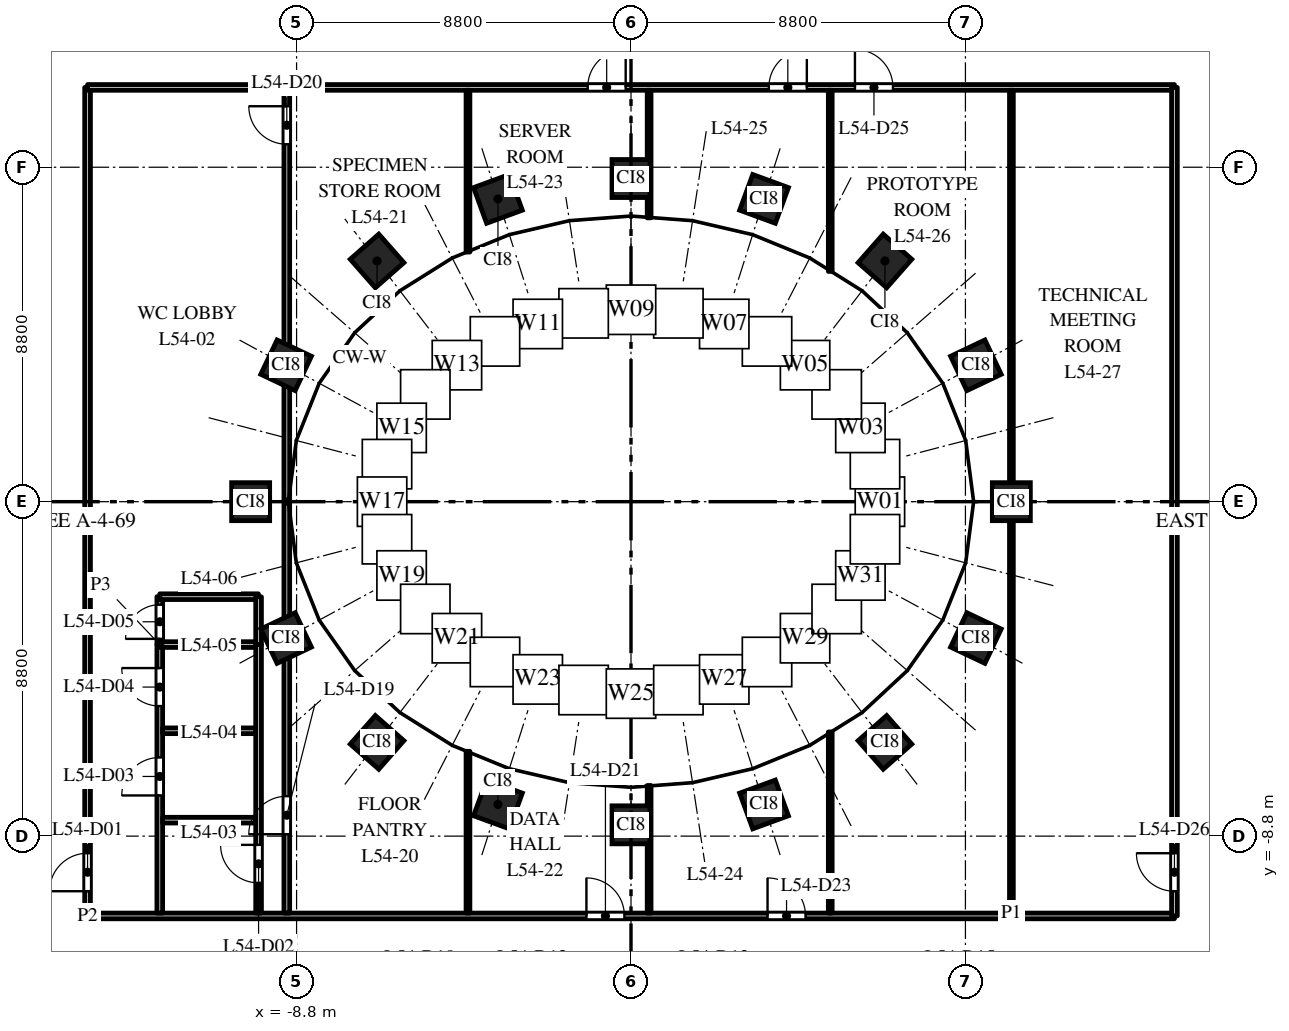
"""IFC4 building model, lengths in metres.
Left out: names, types, materials, properties, quantities, classifications, styles, units other than length and angle.
Written with IfcOpenShell. Run it as: python <this file> out.ifc"""

import sys

from ifc_helpers import new_model, si_unit, direction, frame, frame_2d, origin, origin_2d, place, context, subcontext, project, spatial, rectangle, extrude, element, fill, save


model = new_model("IFC4")
c1 = context("Model", 3, precision=1e-05, world=origin(), true_north=direction((0.0, 1.0)))
c2 = subcontext(c1, "Body", "Model", "MODEL_VIEW")
j1 = project(units=[si_unit("LENGTHUNIT", "METRE"), si_unit("PLANEANGLEUNIT", "RADIAN")], contexts=[c1])
p1 = place(None, origin())
s1 = spatial("IfcSite", under=j1, at=p1, CompositionType="ELEMENT")
p2 = place(p1, origin())
s2 = spatial("IfcBuilding", under=s1, at=p2, CompositionType="ELEMENT")
p3 = place(p2, frame((0.0, 0.0, 257.5)))
s3 = spatial("IfcBuildingStorey", under=s2, at=p3, CompositionType="ELEMENT", Elevation=257.5)
for number, where, z_axis, x_axis in (
    (1, (10.008, 0.0, 0.0), (0.0, 0.0, 1.0), (0.0, 1.0, 0.0)),
    (2, (9.076, 3.588, 0.0), (0.0, 0.0, 1.0), (-0.429, 0.903, 0.0)),
    (3, (6.682, 6.334, 0.0), (0.0, 0.0, 1.0), (-0.751, 0.66, 0.0)),
    (4, (3.501, 7.967, 0.0), (0.0, 0.0, 1.0), (-0.939, 0.344, 0.0)),
    (5, (0.0, 8.503, 0.0), (0.0, 0.0, 1.0), (-1.0, 0.0, 0.0)),
    (6, (-3.501, 7.967, 0.0), (0.0, 0.0, 1.0), (-0.939, -0.344, 0.0)),
    (7, (-6.682, 6.334, 0.0), (0.0, 0.0, 1.0), (-0.751, -0.66, 0.0)),
    (8, (-9.076, 3.588, 0.0), (0.0, 0.0, 1.0), (-0.429, -0.903, 0.0)),
    (9, (-10.008, 0.0, 0.0), (0.0, 0.0, 1.0), (0.0, -1.0, 0.0)),
    (10, (-9.076, -3.588, 0.0), (0.0, 0.0, 1.0), (0.429, -0.903, 0.0)),
    (11, (-6.682, -6.334, 0.0), (0.0, 0.0, 1.0), (0.751, -0.66, 0.0)),
    (12, (-3.501, -7.967, 0.0), (0.0, 0.0, 1.0), (0.939, -0.344, 0.0)),
    (13, (0.0, -8.503, 0.0), (0.0, 0.0, 1.0), (1.0, 0.0, 0.0)),
    (14, (3.501, -7.967, 0.0), (0.0, 0.0, 1.0), (0.939, 0.344, 0.0)),
    (15, (6.682, -6.334, 0.0), (0.0, 0.0, 1.0), (0.751, 0.66, 0.0)),
    (16, (9.076, -3.588, 0.0), (0.0, 0.0, 1.0), (0.429, 0.903, 0.0)),
):
    element("IfcColumn", number, at=place(p3, frame(where, z_axis=z_axis, x_axis=x_axis)), inside=s3, PredefinedType="COLUMN", context=c2, shape_type="SweptSolid", body=[
        extrude(rectangle(XDim=1.0, YDim=1.0, at=origin_2d()), origin(), (0.0, 0.0, 1.0), 4.0),
    ])
p4 = place(p3, frame((-14.3, -10.9, 0.0), z_axis=(0.0, 0.0, 1.0), x_axis=(0.0, 1.0, 0.0)))
e17 = element("IfcWall", 17, at=p4, inside=s3, PredefinedType="PARTITIONING", context=c2, shape_type="SweptSolid", body=[
    extrude(rectangle(XDim=21.8, YDim=0.15, at=frame_2d((10.9, 0.0))), origin(), (0.0, 0.0, 1.0), 2.75),
])
p5 = place(p4, frame((0.65, 0.0, 0.0)))
e18 = element("IfcOpeningElement", 18, at=p5, cuts=e17, PredefinedType="OPENING", context=c2, shape_type="SweptSolid", body=[
    extrude(rectangle(XDim=1.0, YDim=2.1, at=frame_2d((0.5, 1.05))), frame((0.0, 0.085, 0.0), z_axis=(0.0, -1.0, 0.0), x_axis=(1.0, 0.0, 0.0)), (0.0, 0.0, 1.0), 0.17),
])
p6 = place(p3, frame((-14.3, -10.9, 0.0), z_axis=(0.0, 0.0, 1.0), x_axis=(1.0, 0.0, 0.0)))
e19 = element("IfcWall", 19, at=p6, inside=s3, PredefinedType="PARTITIONING", context=c2, shape_type="SweptSolid", body=[
    extrude(rectangle(XDim=28.6, YDim=0.15, at=frame_2d((14.3, 0.0))), origin(), (0.0, 0.0, 1.0), 2.85),
])
p7 = place(p6, frame((13.127, 0.0, 0.0)))
e20 = element("IfcOpeningElement", 20, at=p7, cuts=e19, PredefinedType="OPENING", context=c2, shape_type="SweptSolid", body=[
    extrude(rectangle(XDim=1.0, YDim=2.1, at=frame_2d((0.5, 1.05))), frame((0.0, 0.085, 0.0), z_axis=(0.0, -1.0, 0.0), x_axis=(1.0, 0.0, 0.0)), (0.0, 0.0, 1.0), 0.17),
])
p8 = place(p6, frame((17.893, 0.0, 0.0)))
e21 = element("IfcOpeningElement", 21, at=p8, cuts=e19, PredefinedType="OPENING", context=c2, shape_type="SweptSolid", body=[
    extrude(rectangle(XDim=1.0, YDim=2.1, at=frame_2d((0.5, 1.05))), frame((0.0, 0.085, 0.0), z_axis=(0.0, -1.0, 0.0), x_axis=(1.0, 0.0, 0.0)), (0.0, 0.0, 1.0), 0.17),
])
p9 = place(p3, frame((-14.3, 10.9, 0.0), z_axis=(0.0, 0.0, 1.0), x_axis=(1.0, 0.0, 0.0)))
e22 = element("IfcWall", 22, at=p9, inside=s3, PredefinedType="PARTITIONING", context=c2, shape_type="SweptSolid", body=[
    extrude(rectangle(XDim=28.6, YDim=0.15, at=frame_2d((14.3, 0.0))), origin(), (0.0, 0.0, 1.0), 2.85),
])
p10 = place(p9, frame((13.16, 0.0, 0.0)))
e23 = element("IfcOpeningElement", 23, at=p10, cuts=e22, PredefinedType="OPENING", context=c2, shape_type="SweptSolid", body=[
    extrude(rectangle(XDim=1.0, YDim=2.1, at=frame_2d((0.5, 1.05))), frame((0.0, 0.085, 0.0), z_axis=(0.0, -1.0, 0.0), x_axis=(1.0, 0.0, 0.0)), (0.0, 0.0, 1.0), 0.17),
])
p11 = place(p9, frame((17.927, 0.0, 0.0)))
e24 = element("IfcOpeningElement", 24, at=p11, cuts=e22, PredefinedType="OPENING", context=c2, shape_type="SweptSolid", body=[
    extrude(rectangle(XDim=1.0, YDim=2.1, at=frame_2d((0.5, 1.05))), frame((0.0, 0.085, 0.0), z_axis=(0.0, -1.0, 0.0), x_axis=(1.0, 0.0, 0.0)), (0.0, 0.0, 1.0), 0.17),
])
p12 = place(p9, frame((20.193, 0.0, 0.0)))
e25 = element("IfcOpeningElement", 25, at=p12, cuts=e22, PredefinedType="OPENING", context=c2, shape_type="SweptSolid", body=[
    extrude(rectangle(XDim=1.0, YDim=2.1, at=frame_2d((0.5, 1.05))), frame((0.0, 0.085, 0.0), z_axis=(0.0, -1.0, 0.0), x_axis=(1.0, 0.0, 0.0)), (0.0, 0.0, 1.0), 0.17),
])
p13 = place(p3, frame((-12.4, -10.825, 0.0), z_axis=(0.0, 0.0, 1.0), x_axis=(0.0, 1.0, 0.0)))
e26 = element("IfcWall", 26, at=p13, inside=s3, PredefinedType="PARTITIONING", context=c2, shape_type="SweptSolid", body=[
    extrude(rectangle(XDim=7.065, YDim=0.15, at=frame_2d((3.532, 0.0))), origin(), (0.0, 0.0, 1.0), 2.75),
])
p14 = place(p13, frame((3.095, 0.0, 0.0)))
e27 = element("IfcOpeningElement", 27, at=p14, cuts=e26, PredefinedType="OPENING", context=c2, shape_type="SweptSolid", body=[
    extrude(rectangle(XDim=1.0, YDim=2.1, at=frame_2d((0.5, 1.05))), frame((0.0, 0.085, 0.0), z_axis=(0.0, -1.0, 0.0), x_axis=(1.0, 0.0, 0.0)), (0.0, 0.0, 1.0), 0.17),
])
p15 = place(p13, frame((5.447, 0.0, 0.0)))
e28 = element("IfcOpeningElement", 28, at=p15, cuts=e26, PredefinedType="OPENING", context=c2, shape_type="SweptSolid", body=[
    extrude(rectangle(XDim=1.0, YDim=2.1, at=frame_2d((0.5, 1.05))), frame((0.0, 0.085, 0.0), z_axis=(0.0, -1.0, 0.0), x_axis=(1.0, 0.0, 0.0)), (0.0, 0.0, 1.0), 0.17),
])
p16 = place(p3, frame((-12.325, -8.38, 0.0), z_axis=(0.0, 0.0, 1.0), x_axis=(1.0, 0.0, 0.0)))
e29 = element("IfcWall", 29, at=p16, inside=s3, PredefinedType="PARTITIONING", context=c2, shape_type="SweptSolid", body=[
    extrude(rectangle(XDim=2.45, YDim=0.15, at=frame_2d((1.225, 0.0))), origin(), (0.0, 0.0, 1.0), 2.75),
])
p17 = place(p3, frame((-12.325, -6.028, 0.0), z_axis=(0.0, 0.0, 1.0), x_axis=(1.0, 0.0, 0.0)))
e30 = element("IfcWall", 30, at=p17, inside=s3, PredefinedType="PARTITIONING", context=c2, shape_type="SweptSolid", body=[
    extrude(rectangle(XDim=2.45, YDim=0.15, at=frame_2d((1.225, 0.0))), origin(), (0.0, 0.0, 1.0), 3.7),
])
p18 = place(p3, frame((-12.4, -3.76, 0.0), z_axis=(0.0, 0.0, 1.0), x_axis=(0.0, 1.0, 0.0)))
e31 = element("IfcWall", 31, at=p18, inside=s3, PredefinedType="PARTITIONING", context=c2, shape_type="SweptSolid", body=[
    extrude(rectangle(XDim=1.26, YDim=0.15, at=frame_2d((0.63, 0.0))), origin(), (0.0, 0.0, 1.0), 3.7),
])
p19 = place(p18, frame((0.15, 0.0, 0.0)))
e32 = element("IfcOpeningElement", 32, at=p19, cuts=e31, PredefinedType="OPENING", context=c2, shape_type="SweptSolid", body=[
    extrude(rectangle(XDim=0.9, YDim=2.1, at=frame_2d((0.45, 1.05))), frame((0.0, 0.085, 0.0), z_axis=(0.0, -1.0, 0.0), x_axis=(1.0, 0.0, 0.0)), (0.0, 0.0, 1.0), 0.17),
])
p20 = place(p3, frame((-12.4, -3.76, 0.0), z_axis=(0.0, 0.0, 1.0), x_axis=(1.0, 0.0, 0.0)))
e33 = element("IfcWall", 33, at=p20, inside=s3, PredefinedType="PARTITIONING", context=c2, shape_type="SweptSolid", body=[
    extrude(rectangle(XDim=2.6, YDim=0.15, at=frame_2d((1.3, 0.0))), origin(), (0.0, 0.0, 1.0), 3.7),
])
p21 = place(p3, frame((-12.4, -2.5, 0.0), z_axis=(0.0, 0.0, 1.0), x_axis=(1.0, 0.0, 0.0)))
e34 = element("IfcWall", 34, at=p21, inside=s3, PredefinedType="PARTITIONING", context=c2, shape_type="SweptSolid", body=[
    extrude(rectangle(XDim=2.596, YDim=0.15, at=frame_2d((1.298, 0.0))), origin(), (0.0, 0.0, 1.0), 3.7),
])
p22 = place(p3, frame((-9.8, -10.825, 0.0), z_axis=(0.0, 0.0, 1.0), x_axis=(0.0, 1.0, 0.0)))
e35 = element("IfcWall", 35, at=p22, inside=s3, PredefinedType="PARTITIONING", context=c2, shape_type="SweptSolid", body=[
    extrude(rectangle(XDim=7.065, YDim=0.15, at=frame_2d((3.532, 0.0))), origin(), (0.0, 0.0, 1.0), 2.75),
])
p23 = place(p22, frame((0.795, 0.0, 0.0)))
e36 = element("IfcOpeningElement", 36, at=p23, cuts=e35, PredefinedType="OPENING", context=c2, shape_type="SweptSolid", body=[
    extrude(rectangle(XDim=1.0, YDim=2.1, at=frame_2d((0.5, 1.05))), frame((0.0, 0.085, 0.0), z_axis=(0.0, -1.0, 0.0), x_axis=(1.0, 0.0, 0.0)), (0.0, 0.0, 1.0), 0.17),
])
p24 = place(p3, frame((-9.8, -3.76, 0.0), z_axis=(0.0, 0.0, 1.0), x_axis=(0.0, 1.0, 0.0)))
e37 = element("IfcWall", 37, at=p24, inside=s3, PredefinedType="PARTITIONING", context=c2, shape_type="SweptSolid", body=[
    extrude(rectangle(XDim=1.256, YDim=0.15, at=frame_2d((0.628, 0.0))), origin(), (0.0, 0.0, 1.0), 3.7),
])
p25 = place(p3, frame((-9.057, -10.825, 0.0), z_axis=(0.0, 0.0, 1.0), x_axis=(0.0, 1.0, 0.0)))
e38 = element("IfcWall", 38, at=p25, inside=s3, PredefinedType="PARTITIONING", context=c2, shape_type="SweptSolid", body=[
    extrude(rectangle(XDim=10.78, YDim=0.15, at=frame_2d((5.39, 0.0))), origin(), (0.0, 0.0, 1.0), 2.75),
])
p26 = place(p25, frame((2.075, 0.0, 0.0)))
e39 = element("IfcOpeningElement", 39, at=p26, cuts=e38, PredefinedType="OPENING", context=c2, shape_type="SweptSolid", body=[
    extrude(rectangle(XDim=1.0, YDim=2.1, at=frame_2d((0.5, 1.05))), frame((0.0, 0.085, 0.0), z_axis=(0.0, -1.0, 0.0), x_axis=(1.0, 0.0, 0.0)), (0.0, 0.0, 1.0), 0.17),
])
p27 = place(p3, frame((-9.057, 0.045, 0.0), z_axis=(0.0, 0.0, 1.0), x_axis=(0.0, 1.0, 0.0)))
e40 = element("IfcWall", 40, at=p27, inside=s3, PredefinedType="PARTITIONING", context=c2, shape_type="SweptSolid", body=[
    extrude(rectangle(XDim=10.78, YDim=0.15, at=frame_2d((5.39, 0.0))), origin(), (0.0, 0.0, 1.0), 2.75),
])
p28 = place(p27, frame((9.36, 0.0, 0.0)))
e41 = element("IfcOpeningElement", 41, at=p28, cuts=e40, PredefinedType="OPENING", context=c2, shape_type="SweptSolid", body=[
    extrude(rectangle(XDim=1.0, YDim=2.1, at=frame_2d((0.5, 1.05))), frame((0.0, 0.085, 0.0), z_axis=(0.0, -1.0, 0.0), x_axis=(1.0, 0.0, 0.0)), (0.0, 0.0, 1.0), 0.17),
])
for number, where, z_axis, x_axis in (
    (42, (-4.29, -10.825, 0.0), (0.0, 0.0, 1.0), (0.0, 1.0, 0.0)),
    (43, (-4.29, 6.568, 0.0), (0.0, 0.0, 1.0), (0.0, 1.0, 0.0)),
):
    element("IfcWall", number, at=place(p3, frame(where, z_axis=z_axis, x_axis=x_axis)), inside=s3, PredefinedType="PARTITIONING", context=c2, shape_type="SweptSolid", body=[
        extrude(rectangle(XDim=4.257, YDim=0.1, at=frame_2d((2.128, 0.0))), origin(), (0.0, 0.0, 1.0), 2.85),
    ])
for number, where, z_axis, x_axis in (
    (44, (0.477, -10.825, 0.0), (0.0, 0.0, 1.0), (0.0, 1.0, 0.0)),
    (45, (0.477, 7.468, 0.0), (0.0, 0.0, 1.0), (0.0, 1.0, 0.0)),
):
    element("IfcWall", number, at=place(p3, frame(where, z_axis=z_axis, x_axis=x_axis)), inside=s3, PredefinedType="PARTITIONING", context=c2, shape_type="SweptSolid", body=[
        extrude(rectangle(XDim=3.357, YDim=0.1, at=frame_2d((1.678, 0.0))), origin(), (0.0, 0.0, 1.0), 3.0),
    ])
for number, where, z_axis, x_axis in (
    (46, (5.243, -10.825, 0.0), (0.0, 0.0, 1.0), (0.0, 1.0, 0.0)),
    (47, (5.243, 6.059, 0.0), (0.0, 0.0, 1.0), (0.0, 1.0, 0.0)),
):
    element("IfcWall", number, at=place(p3, frame(where, z_axis=z_axis, x_axis=x_axis)), inside=s3, PredefinedType="PARTITIONING", context=c2, shape_type="SweptSolid", body=[
        extrude(rectangle(XDim=4.766, YDim=0.1, at=frame_2d((2.383, 0.0))), origin(), (0.0, 0.0, 1.0), 2.85),
    ])
p29 = place(p3, frame((10.01, -10.825, 0.0), z_axis=(0.0, 0.0, 1.0), x_axis=(0.0, 1.0, 0.0)))
e48 = element("IfcWall", 48, at=p29, inside=s3, PredefinedType="PARTITIONING", context=c2, shape_type="SweptSolid", body=[
    extrude(rectangle(XDim=21.65, YDim=0.1, at=frame_2d((10.825, 0.0))), origin(), (0.0, 0.0, 1.0), 2.75),
])
p30 = place(p3, frame((14.3, -10.9, 0.0), z_axis=(0.0, 0.0, 1.0), x_axis=(0.0, 1.0, 0.0)))
e49 = element("IfcWall", 49, at=p30, inside=s3, PredefinedType="PARTITIONING", context=c2, shape_type="SweptSolid", body=[
    extrude(rectangle(XDim=21.8, YDim=0.15, at=frame_2d((10.9, 0.0))), origin(), (0.0, 0.0, 1.0), 2.75),
])
p31 = place(p30, frame((0.65, 0.0, 0.0)))
e50 = element("IfcOpeningElement", 50, at=p31, cuts=e49, PredefinedType="OPENING", context=c2, shape_type="SweptSolid", body=[
    extrude(rectangle(XDim=1.0, YDim=2.1, at=frame_2d((0.5, 1.05))), frame((0.0, 0.085, 0.0), z_axis=(0.0, -1.0, 0.0), x_axis=(1.0, 0.0, 0.0)), (0.0, 0.0, 1.0), 0.17),
])
p32 = place(p5, origin())
e51 = element("IfcDoor", 51, at=p32, inside=s3, OperationType="SINGLE_SWING_LEFT", PredefinedType="DOOR", context=c2, shape_type="SweptSolid", body=[
    extrude(rectangle(XDim=1.0, YDim=2.1, at=frame_2d((0.5, 1.05))), frame((0.0, 0.025, 0.0), z_axis=(0.0, -1.0, 0.0), x_axis=(1.0, 0.0, 0.0)), (0.0, 0.0, 1.0), 0.05),
])
fill(e18, e51)
p33 = place(p23, origin())
e52 = element("IfcDoor", 52, at=p33, inside=s3, OperationType="SINGLE_SWING_RIGHT", PredefinedType="DOOR", context=c2, shape_type="SweptSolid", body=[
    extrude(rectangle(XDim=1.0, YDim=2.1, at=frame_2d((0.5, 1.05))), frame((0.0, 0.025, 0.0), z_axis=(0.0, -1.0, 0.0), x_axis=(1.0, 0.0, 0.0)), (0.0, 0.0, 1.0), 0.05),
])
fill(e36, e52)
p34 = place(p14, origin())
e53 = element("IfcDoor", 53, at=p34, inside=s3, OperationType="SINGLE_SWING_LEFT", PredefinedType="DOOR", context=c2, shape_type="SweptSolid", body=[
    extrude(rectangle(XDim=1.0, YDim=2.1, at=frame_2d((0.5, 1.05))), frame((0.0, 0.025, 0.0), z_axis=(0.0, -1.0, 0.0), x_axis=(1.0, 0.0, 0.0)), (0.0, 0.0, 1.0), 0.05),
])
fill(e27, e53)
p35 = place(p15, origin())
e54 = element("IfcDoor", 54, at=p35, inside=s3, OperationType="SINGLE_SWING_RIGHT", PredefinedType="DOOR", context=c2, shape_type="SweptSolid", body=[
    extrude(rectangle(XDim=1.0, YDim=2.1, at=frame_2d((0.5, 1.05))), frame((0.0, 0.025, 0.0), z_axis=(0.0, -1.0, 0.0), x_axis=(1.0, 0.0, 0.0)), (0.0, 0.0, 1.0), 0.05),
])
fill(e28, e54)
p36 = place(p19, origin())
e55 = element("IfcDoor", 55, at=p36, inside=s3, OperationType="SINGLE_SWING_LEFT", PredefinedType="DOOR", context=c2, shape_type="SweptSolid", body=[
    extrude(rectangle(XDim=0.9, YDim=2.1, at=frame_2d((0.45, 1.05))), frame((0.0, 0.025, 0.0), z_axis=(0.0, -1.0, 0.0), x_axis=(1.0, 0.0, 0.0)), (0.0, 0.0, 1.0), 0.05),
])
fill(e32, e55)
p37 = place(p26, origin())
e56 = element("IfcDoor", 56, at=p37, inside=s3, OperationType="SINGLE_SWING_LEFT", PredefinedType="DOOR", context=c2, shape_type="SweptSolid", body=[
    extrude(rectangle(XDim=1.0, YDim=2.1, at=frame_2d((0.5, 1.05))), frame((0.0, 0.025, 0.0), z_axis=(0.0, -1.0, 0.0), x_axis=(1.0, 0.0, 0.0)), (0.0, 0.0, 1.0), 0.05),
])
fill(e39, e56)
p38 = place(p28, origin())
e57 = element("IfcDoor", 57, at=p38, inside=s3, OperationType="SINGLE_SWING_RIGHT", PredefinedType="DOOR", context=c2, shape_type="SweptSolid", body=[
    extrude(rectangle(XDim=1.0, YDim=2.1, at=frame_2d((0.5, 1.05))), frame((0.0, 0.025, 0.0), z_axis=(0.0, -1.0, 0.0), x_axis=(1.0, 0.0, 0.0)), (0.0, 0.0, 1.0), 0.05),
])
fill(e41, e57)
p39 = place(p7, origin())
e58 = element("IfcDoor", 58, at=p39, inside=s3, OperationType="SINGLE_SWING_LEFT", PredefinedType="DOOR", context=c2, shape_type="SweptSolid", body=[
    extrude(rectangle(XDim=1.0, YDim=2.1, at=frame_2d((0.5, 1.05))), frame((0.0, 0.025, 0.0), z_axis=(0.0, -1.0, 0.0), x_axis=(1.0, 0.0, 0.0)), (0.0, 0.0, 1.0), 0.05),
])
fill(e20, e58)
p40 = place(p10, origin())
e59 = element("IfcDoor", 59, at=p40, inside=s3, OperationType="SINGLE_SWING_RIGHT", PredefinedType="DOOR", context=c2, shape_type="SweptSolid", body=[
    extrude(rectangle(XDim=1.0, YDim=2.1, at=frame_2d((0.5, 1.05))), frame((0.0, 0.025, 0.0), z_axis=(0.0, -1.0, 0.0), x_axis=(1.0, 0.0, 0.0)), (0.0, 0.0, 1.0), 0.05),
])
fill(e23, e59)
p41 = place(p8, origin())
e60 = element("IfcDoor", 60, at=p41, inside=s3, OperationType="SINGLE_SWING_LEFT", PredefinedType="DOOR", context=c2, shape_type="SweptSolid", body=[
    extrude(rectangle(XDim=1.0, YDim=2.1, at=frame_2d((0.5, 1.05))), frame((0.0, 0.025, 0.0), z_axis=(0.0, -1.0, 0.0), x_axis=(1.0, 0.0, 0.0)), (0.0, 0.0, 1.0), 0.05),
])
fill(e21, e60)
p42 = place(p11, origin())
e61 = element("IfcDoor", 61, at=p42, inside=s3, OperationType="SINGLE_SWING_RIGHT", PredefinedType="DOOR", context=c2, shape_type="SweptSolid", body=[
    extrude(rectangle(XDim=1.0, YDim=2.1, at=frame_2d((0.5, 1.05))), frame((0.0, 0.025, 0.0), z_axis=(0.0, -1.0, 0.0), x_axis=(1.0, 0.0, 0.0)), (0.0, 0.0, 1.0), 0.05),
])
fill(e24, e61)
p43 = place(p12, origin())
e62 = element("IfcDoor", 62, at=p43, inside=s3, OperationType="SINGLE_SWING_LEFT", PredefinedType="DOOR", context=c2, shape_type="SweptSolid", body=[
    extrude(rectangle(XDim=1.0, YDim=2.1, at=frame_2d((0.5, 1.05))), frame((0.0, 0.025, 0.0), z_axis=(0.0, -1.0, 0.0), x_axis=(1.0, 0.0, 0.0)), (0.0, 0.0, 1.0), 0.05),
])
fill(e25, e62)
p44 = place(p31, origin())
e63 = element("IfcDoor", 63, at=p44, inside=s3, OperationType="SINGLE_SWING_RIGHT", PredefinedType="DOOR", context=c2, shape_type="SweptSolid", body=[
    extrude(rectangle(XDim=1.0, YDim=2.1, at=frame_2d((0.5, 1.05))), frame((0.0, 0.025, 0.0), z_axis=(0.0, -1.0, 0.0), x_axis=(1.0, 0.0, 0.0)), (0.0, 0.0, 1.0), 0.05),
])
fill(e50, e63)
save(model, sys.argv[1])
